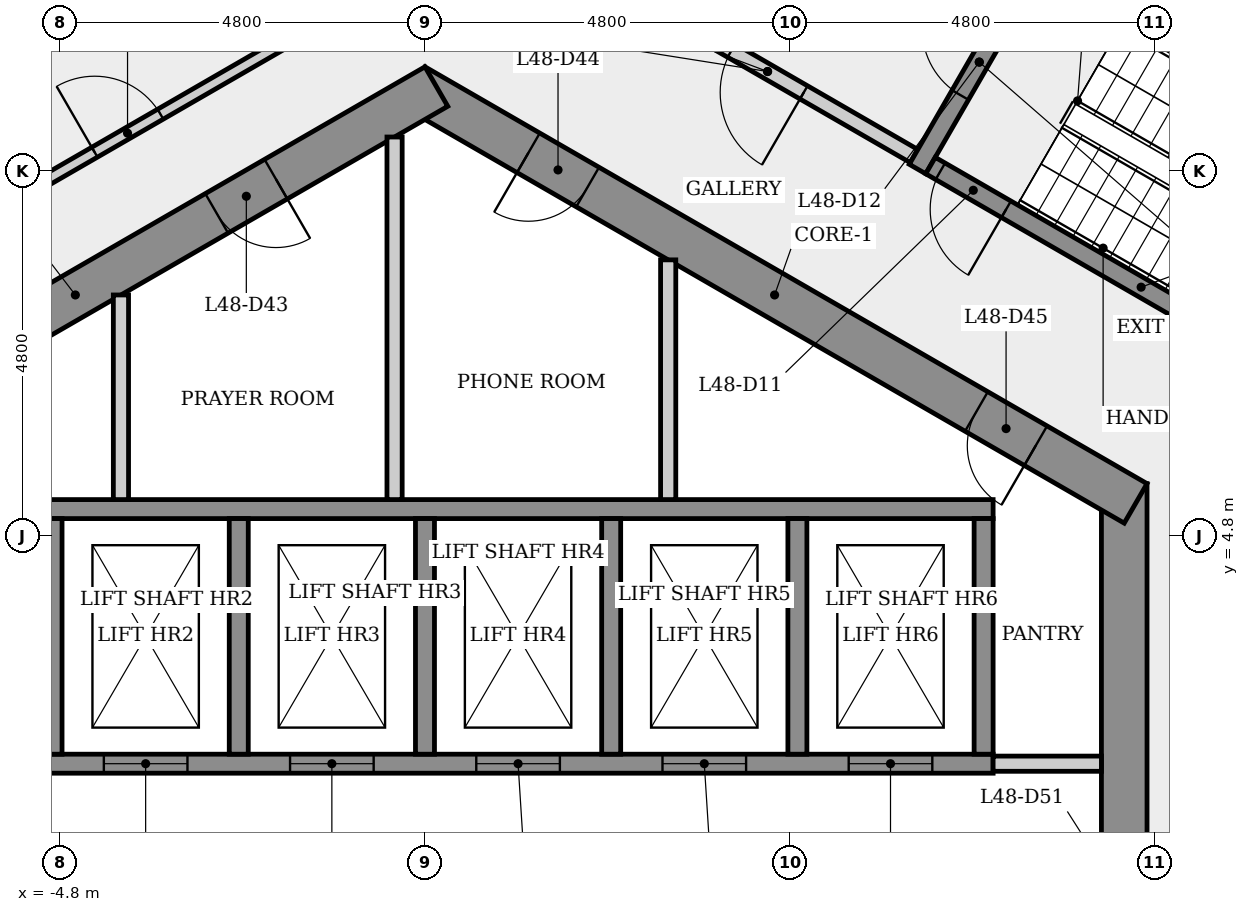
"""IFC4 building model, lengths in metres.
Left out: names, types, materials, properties, quantities, classifications, styles, units other than length and angle.
Written with IfcOpenShell. Run it as: python <this file> out.ifc"""

import sys

from ifc_helpers import new_model, si_unit, direction, frame, frame_2d, origin, place, context, subcontext, project, spatial, rectangle, extrude, element, fill, save


model = new_model("IFC4")
c1 = context("Model", 3, precision=1e-05, world=origin(), true_north=direction((0.0, 1.0)))
c2 = subcontext(c1, "Body", "Model", "MODEL_VIEW")
j1 = project(units=[si_unit("LENGTHUNIT", "METRE"), si_unit("PLANEANGLEUNIT", "RADIAN")], contexts=[c1])
p1 = place(None, origin())
s1 = spatial("IfcSite", under=j1, at=p1, CompositionType="ELEMENT")
p2 = place(p1, origin())
s2 = spatial("IfcBuilding", under=s1, at=p2, CompositionType="ELEMENT")
p3 = place(p2, frame((0.0, 0.0, 179.9)))
s3 = spatial("IfcBuildingStorey", under=s2, at=p3, CompositionType="ELEMENT", Elevation=179.9)
p4 = place(p3, frame((9.2, -5.485, 0.0), z_axis=(0.0, 0.0, 1.0), x_axis=(0.0, 1.0, 0.0)))
e1 = element("IfcWall", 1, at=p4, inside=s3, PredefinedType="SHEAR", context=c2, shape_type="SweptSolid", body=[
    extrude(rectangle(XDim=10.97, YDim=0.6, at=frame_2d((5.485, 0.0))), origin(), (0.0, 0.0, 1.0), 3.4),
])
p5 = place(p4, frame((4.685, 0.0, 0.0)))
e2 = element("IfcOpeningElement", 2, at=p5, cuts=e1, PredefinedType="OPENING", context=c2, shape_type="SweptSolid", body=[
    extrude(rectangle(XDim=1.6, YDim=2.1, at=frame_2d((0.8, 1.05))), frame((0.0, 0.31, 0.0), z_axis=(0.0, -1.0, 0.0), x_axis=(1.0, 0.0, 0.0)), (0.0, 0.0, 1.0), 0.62),
])
p6 = place(p3, frame((9.35, 5.225, 0.0), z_axis=(0.0, 0.0, 1.0), x_axis=(-0.866023993627, 0.500002442456, 0.0)))
e3 = element("IfcWall", 3, at=p6, inside=s3, PredefinedType="SHEAR", context=c2, shape_type="SweptSolid", body=[
    extrude(rectangle(XDim=10.97, YDim=0.6, at=frame_2d((5.485, 0.0))), origin(), (0.0, 0.0, 1.0), 3.4),
])
p7 = place(p6, frame((8.325, 0.0, 0.0)))
e4 = element("IfcOpeningElement", 4, at=p7, cuts=e3, PredefinedType="OPENING", context=c2, shape_type="SweptSolid", body=[
    extrude(rectangle(XDim=0.9, YDim=2.1, at=frame_2d((0.45, 1.05))), frame((0.0, 0.31, 0.0), z_axis=(0.0, -1.0, 0.0), x_axis=(1.0, 0.0, 0.0)), (0.0, 0.0, 1.0), 0.62),
])
p8 = place(p6, frame((1.518, 0.0, 0.0)))
e5 = element("IfcOpeningElement", 5, at=p8, cuts=e3, PredefinedType="OPENING", context=c2, shape_type="SweptSolid", body=[
    extrude(rectangle(XDim=0.9, YDim=2.1, at=frame_2d((0.45, 1.05))), frame((0.0, 0.31, 0.0), z_axis=(0.0, -1.0, 0.0), x_axis=(1.0, 0.0, 0.0)), (0.0, 0.0, 1.0), 0.62),
])
p9 = place(p3, frame((0.15, 10.71, 0.0), z_axis=(0.0, 0.0, 1.0), x_axis=(-0.866023993627, -0.500002442456, 0.0)))
e6 = element("IfcWall", 6, at=p9, inside=s3, PredefinedType="SHEAR", context=c2, shape_type="SweptSolid", body=[
    extrude(rectangle(XDim=10.97, YDim=0.6, at=frame_2d((5.485, 0.0))), origin(), (0.0, 0.0, 1.0), 3.4),
])
p10 = place(p9, frame((9.013, 0.0, 0.0)))
e7 = element("IfcOpeningElement", 7, at=p10, cuts=e6, PredefinedType="OPENING", context=c2, shape_type="SweptSolid", body=[
    extrude(rectangle(XDim=0.9, YDim=2.1, at=frame_2d((0.45, 1.05))), frame((0.0, 0.31, 0.0), z_axis=(0.0, -1.0, 0.0), x_axis=(1.0, 0.0, 0.0)), (0.0, 0.0, 1.0), 0.62),
])
p11 = place(p9, frame((2.437, 0.0, 0.0)))
e8 = element("IfcOpeningElement", 8, at=p11, cuts=e6, PredefinedType="OPENING", context=c2, shape_type="SweptSolid", body=[
    extrude(rectangle(XDim=0.9, YDim=2.1, at=frame_2d((0.45, 1.05))), frame((0.0, 0.31, 0.0), z_axis=(0.0, -1.0, 0.0), x_axis=(1.0, 0.0, 0.0)), (0.0, 0.0, 1.0), 0.62),
])
p12 = place(p3, frame((-9.556, 6.838, 0.0), z_axis=(0.0, 0.0, 1.0), x_axis=(0.866029004385, 0.499993763526, 0.0)))
e9 = element("IfcWall", 9, at=p12, inside=s3, PredefinedType="PARTITIONING", context=c2, shape_type="SweptSolid", body=[
    extrude(rectangle(XDim=9.789, YDim=0.15, at=frame_2d((4.895, 0.0))), origin(), (0.0, 0.0, 1.0), 3.05),
])
p13 = place(p12, frame((6.016, 0.0, 0.0)))
e10 = element("IfcOpeningElement", 10, at=p13, cuts=e9, PredefinedType="OPENING", context=c2, shape_type="SweptSolid", body=[
    extrude(rectangle(XDim=1.0, YDim=2.1, at=frame_2d((0.5, 1.05))), frame((0.0, 0.085, 0.0), z_axis=(0.0, -1.0, 0.0), x_axis=(1.0, 0.0, 0.0)), (0.0, 0.0, 1.0), 0.17),
])
p14 = place(p3, frame((-7.475, 1.8, 0.0), z_axis=(0.0, 0.0, 1.0), x_axis=(1.0, 0.0, 0.0)))
e11 = element("IfcWall", 11, at=p14, inside=s3, PredefinedType="SHEAR", context=c2, shape_type="SweptSolid", body=[
    extrude(rectangle(XDim=14.95, YDim=0.25, at=frame_2d((7.475, 0.0))), origin(), (0.0, 0.0, 1.0), 3.05),
])
p15 = place(p14, frame((0.8, 0.0, 0.0)))
e12 = element("IfcOpeningElement", 12, at=p15, cuts=e11, PredefinedType="OPENING", context=c2, shape_type="SweptSolid", body=[
    extrude(rectangle(XDim=1.1, YDim=2.1, at=frame_2d((0.55, 1.05))), frame((0.0, 0.135, 0.0), z_axis=(0.0, -1.0, 0.0), x_axis=(1.0, 0.0, 0.0)), (0.0, 0.0, 1.0), 0.27),
])
p16 = place(p14, frame((3.25, 0.0, 0.0)))
e13 = element("IfcOpeningElement", 13, at=p16, cuts=e11, PredefinedType="OPENING", context=c2, shape_type="SweptSolid", body=[
    extrude(rectangle(XDim=1.1, YDim=2.1, at=frame_2d((0.55, 1.05))), frame((0.0, 0.135, 0.0), z_axis=(0.0, -1.0, 0.0), x_axis=(1.0, 0.0, 0.0)), (0.0, 0.0, 1.0), 0.27),
])
p17 = place(p14, frame((5.7, 0.0, 0.0)))
e14 = element("IfcOpeningElement", 14, at=p17, cuts=e11, PredefinedType="OPENING", context=c2, shape_type="SweptSolid", body=[
    extrude(rectangle(XDim=1.1, YDim=2.1, at=frame_2d((0.55, 1.05))), frame((0.0, 0.135, 0.0), z_axis=(0.0, -1.0, 0.0), x_axis=(1.0, 0.0, 0.0)), (0.0, 0.0, 1.0), 0.27),
])
p18 = place(p14, frame((8.15, 0.0, 0.0)))
e15 = element("IfcOpeningElement", 15, at=p18, cuts=e11, PredefinedType="OPENING", context=c2, shape_type="SweptSolid", body=[
    extrude(rectangle(XDim=1.1, YDim=2.1, at=frame_2d((0.55, 1.05))), frame((0.0, 0.135, 0.0), z_axis=(0.0, -1.0, 0.0), x_axis=(1.0, 0.0, 0.0)), (0.0, 0.0, 1.0), 0.27),
])
p19 = place(p14, frame((10.6, 0.0, 0.0)))
e16 = element("IfcOpeningElement", 16, at=p19, cuts=e11, PredefinedType="OPENING", context=c2, shape_type="SweptSolid", body=[
    extrude(rectangle(XDim=1.1, YDim=2.1, at=frame_2d((0.55, 1.05))), frame((0.0, 0.135, 0.0), z_axis=(0.0, -1.0, 0.0), x_axis=(1.0, 0.0, 0.0)), (0.0, 0.0, 1.0), 0.27),
])
p20 = place(p14, frame((13.05, 0.0, 0.0)))
e17 = element("IfcOpeningElement", 17, at=p20, cuts=e11, PredefinedType="OPENING", context=c2, shape_type="SweptSolid", body=[
    extrude(rectangle(XDim=1.1, YDim=2.1, at=frame_2d((0.55, 1.05))), frame((0.0, 0.135, 0.0), z_axis=(0.0, -1.0, 0.0), x_axis=(1.0, 0.0, 0.0)), (0.0, 0.0, 1.0), 0.27),
])
p21 = place(p3, frame((-7.225, 5.15, 0.0), z_axis=(0.0, 0.0, 1.0), x_axis=(1.0, 0.0, 0.0)))
e18 = element("IfcWall", 18, at=p21, inside=s3, PredefinedType="SHEAR", context=c2, shape_type="SweptSolid", body=[
    extrude(rectangle(XDim=14.7, YDim=0.25, at=frame_2d((7.35, 0.0))), origin(), (0.0, 0.0, 1.0), 3.05),
])
p22 = place(p3, frame((-4.9, 5.025, 0.0), z_axis=(0.0, 0.0, 1.0), x_axis=(0.0, -1.0, 0.0)))
e19 = element("IfcWall", 19, at=p22, inside=s3, PredefinedType="SHEAR", context=c2, shape_type="SweptSolid", body=[
    extrude(rectangle(XDim=3.1, YDim=0.25, at=frame_2d((1.55, 0.0))), origin(), (0.0, 0.0, 1.0), 3.4),
])
p23 = place(p3, frame((-4.0, 7.967, 0.0), z_axis=(0.0, 0.0, 1.0), x_axis=(0.0, -1.0, 0.0)))
e20 = element("IfcWall", 20, at=p23, inside=s3, PredefinedType="PARTITIONING", context=c2, shape_type="SweptSolid", body=[
    extrude(rectangle(XDim=2.692, YDim=0.2, at=frame_2d((1.346, 0.0))), origin(), (0.0, 0.0, 1.0), 3.05),
])
p24 = place(p3, frame((-2.45, 5.025, 0.0), z_axis=(0.0, 0.0, 1.0), x_axis=(0.0, -1.0, 0.0)))
e21 = element("IfcWall", 21, at=p24, inside=s3, PredefinedType="SHEAR", context=c2, shape_type="SweptSolid", body=[
    extrude(rectangle(XDim=3.1, YDim=0.25, at=frame_2d((1.55, 0.0))), origin(), (0.0, 0.0, 1.0), 3.4),
])
p25 = place(p3, frame((-0.4, 10.046, 0.0), z_axis=(0.0, 0.0, 1.0), x_axis=(0.0, -1.0, 0.0)))
e22 = element("IfcWall", 22, at=p25, inside=s3, PredefinedType="PARTITIONING", context=c2, shape_type="SweptSolid", body=[
    extrude(rectangle(XDim=4.771, YDim=0.2, at=frame_2d((2.385, 0.0))), origin(), (0.0, 0.0, 1.0), 3.05),
])
for number, where, z_axis, x_axis in (
    (23, (0.0, 5.025, 0.0), (0.0, 0.0, 1.0), (0.0, -1.0, 0.0)),
    (24, (2.45, 5.025, 0.0), (0.0, 0.0, 1.0), (0.0, -1.0, 0.0)),
):
    element("IfcWall", number, at=place(p3, frame(where, z_axis=z_axis, x_axis=x_axis)), inside=s3, PredefinedType="SHEAR", context=c2, shape_type="SweptSolid", body=[
        extrude(rectangle(XDim=3.1, YDim=0.25, at=frame_2d((1.55, 0.0))), origin(), (0.0, 0.0, 1.0), 3.4),
    ])
p26 = place(p3, frame((3.2, 8.429, 0.0), z_axis=(0.0, 0.0, 1.0), x_axis=(0.0, -1.0, 0.0)))
e25 = element("IfcWall", 25, at=p26, inside=s3, PredefinedType="PARTITIONING", context=c2, shape_type="SweptSolid", body=[
    extrude(rectangle(XDim=3.154, YDim=0.2, at=frame_2d((1.577, 0.0))), origin(), (0.0, 0.0, 1.0), 3.05),
])
p27 = place(p3, frame((4.9, 5.025, 0.0), z_axis=(0.0, 0.0, 1.0), x_axis=(0.0, -1.0, 0.0)))
e26 = element("IfcWall", 26, at=p27, inside=s3, PredefinedType="SHEAR", context=c2, shape_type="SweptSolid", body=[
    extrude(rectangle(XDim=3.1, YDim=0.25, at=frame_2d((1.55, 0.0))), origin(), (0.0, 0.0, 1.0), 3.4),
])
p28 = place(p3, frame((6.435, 9.795, 0.0), z_axis=(0.0, 0.0, 1.0), x_axis=(-0.866012907634, 0.500021643343, 0.0)))
e27 = element("IfcWall", 27, at=p28, inside=s3, PredefinedType="PARTITIONING", context=c2, shape_type="SweptSolid", body=[
    extrude(rectangle(XDim=4.45, YDim=0.2, at=frame_2d((2.225, 0.0))), origin(), (0.0, 0.0, 1.0), 3.05),
])
p29 = place(p28, frame((1.675, 0.0, 0.0)))
e28 = element("IfcOpeningElement", 28, at=p29, cuts=e27, PredefinedType="OPENING", context=c2, shape_type="SweptSolid", body=[
    extrude(rectangle(XDim=1.1, YDim=2.1, at=frame_2d((0.55, 1.05))), frame((0.0, 0.11, 0.0), z_axis=(0.0, -1.0, 0.0), x_axis=(1.0, 0.0, 0.0)), (0.0, 0.0, 1.0), 0.22),
])
p30 = place(p3, frame((6.48, 9.624, 0.0), z_axis=(0.0, 0.0, 1.0), x_axis=(0.500017246033, 0.866015446554, 0.0)))
e29 = element("IfcWall", 29, at=p30, inside=s3, PredefinedType="SHEAR", context=c2, shape_type="SweptSolid", body=[
    extrude(rectangle(XDim=3.25, YDim=0.25, at=frame_2d((1.625, 0.0))), origin(), (0.0, 0.0, 1.0), 3.05),
])
p31 = place(p30, frame((1.125, 0.0, 0.0)))
e30 = element("IfcOpeningElement", 30, at=p31, cuts=e29, PredefinedType="OPENING", context=c2, shape_type="SweptSolid", body=[
    extrude(rectangle(XDim=1.0, YDim=2.1, at=frame_2d((0.5, 1.05))), frame((0.0, 0.135, 0.0), z_axis=(0.0, -1.0, 0.0), x_axis=(1.0, 0.0, 0.0)), (0.0, 0.0, 1.0), 0.27),
])
p32 = place(p3, frame((7.475, 1.8, 0.0), z_axis=(0.0, 0.0, 1.0), x_axis=(1.0, 0.0, 0.0)))
e31 = element("IfcWall", 31, at=p32, inside=s3, PredefinedType="PARTITIONING", context=c2, shape_type="SweptSolid", body=[
    extrude(rectangle(XDim=1.425, YDim=0.2, at=frame_2d((0.712, 0.0))), origin(), (0.0, 0.0, 1.0), 3.05),
])
p33 = place(p3, frame((7.35, 5.025, 0.0), z_axis=(0.0, 0.0, 1.0), x_axis=(0.0, -1.0, 0.0)))
e32 = element("IfcWall", 32, at=p33, inside=s3, PredefinedType="SHEAR", context=c2, shape_type="SweptSolid", body=[
    extrude(rectangle(XDim=3.1, YDim=0.25, at=frame_2d((1.55, 0.0))), origin(), (0.0, 0.0, 1.0), 3.4),
])
p34 = place(p3, frame((8.151, 12.268, 0.0), z_axis=(0.0, 0.0, 1.0), x_axis=(0.866025499775, -0.499999833739, 0.0)))
e33 = element("IfcWall", 33, at=p34, inside=s3, PredefinedType="SHEAR", context=c2, shape_type="SweptSolid", body=[
    extrude(rectangle(XDim=6.4, YDim=0.25, at=frame_2d((3.2, 0.0))), origin(), (0.0, 0.0, 1.0), 3.05),
])
p35 = place(p3, frame((12.194, 6.47, 0.0), z_axis=(0.0, 0.0, 1.0), x_axis=(-0.866025499775, 0.499999833739, 0.0)))
e34 = element("IfcWall", 34, at=p35, inside=s3, PredefinedType="SHEAR", context=c2, shape_type="SweptSolid", body=[
    extrude(rectangle(XDim=6.4, YDim=0.25, at=frame_2d((3.2, 0.0))), origin(), (0.0, 0.0, 1.0), 3.05),
])
p36 = place(p35, frame((5.25, 0.0, 0.0)))
e35 = element("IfcOpeningElement", 35, at=p36, cuts=e34, PredefinedType="OPENING", context=c2, shape_type="SweptSolid", body=[
    extrude(rectangle(XDim=1.0, YDim=2.1, at=frame_2d((0.5, 1.05))), frame((0.0, 0.135, 0.0), z_axis=(0.0, -1.0, 0.0), x_axis=(1.0, 0.0, 0.0)), (0.0, 0.0, 1.0), 0.27),
])
p37 = place(p16, origin())
e36 = element("IfcDoor", 36, at=p37, inside=s3, OperationType="SLIDING_TO_LEFT", PredefinedType="DOOR", context=c2, shape_type="SweptSolid", body=[
    extrude(rectangle(XDim=1.1, YDim=2.1, at=frame_2d((0.55, 1.05))), frame((0.0, 0.025, 0.0), z_axis=(0.0, -1.0, 0.0), x_axis=(1.0, 0.0, 0.0)), (0.0, 0.0, 1.0), 0.05),
])
fill(e13, e36)
p38 = place(p17, origin())
e37 = element("IfcDoor", 37, at=p38, inside=s3, OperationType="SLIDING_TO_LEFT", PredefinedType="DOOR", context=c2, shape_type="SweptSolid", body=[
    extrude(rectangle(XDim=1.1, YDim=2.1, at=frame_2d((0.55, 1.05))), frame((0.0, 0.025, 0.0), z_axis=(0.0, -1.0, 0.0), x_axis=(1.0, 0.0, 0.0)), (0.0, 0.0, 1.0), 0.05),
])
fill(e14, e37)
p39 = place(p18, origin())
e38 = element("IfcDoor", 38, at=p39, inside=s3, OperationType="SLIDING_TO_LEFT", PredefinedType="DOOR", context=c2, shape_type="SweptSolid", body=[
    extrude(rectangle(XDim=1.1, YDim=2.1, at=frame_2d((0.55, 1.05))), frame((0.0, 0.025, 0.0), z_axis=(0.0, -1.0, 0.0), x_axis=(1.0, 0.0, 0.0)), (0.0, 0.0, 1.0), 0.05),
])
fill(e15, e38)
p40 = place(p19, origin())
e39 = element("IfcDoor", 39, at=p40, inside=s3, OperationType="SLIDING_TO_LEFT", PredefinedType="DOOR", context=c2, shape_type="SweptSolid", body=[
    extrude(rectangle(XDim=1.1, YDim=2.1, at=frame_2d((0.55, 1.05))), frame((0.0, 0.025, 0.0), z_axis=(0.0, -1.0, 0.0), x_axis=(1.0, 0.0, 0.0)), (0.0, 0.0, 1.0), 0.05),
])
fill(e16, e39)
p41 = place(p20, origin())
e40 = element("IfcDoor", 40, at=p41, inside=s3, OperationType="SLIDING_TO_LEFT", PredefinedType="DOOR", context=c2, shape_type="SweptSolid", body=[
    extrude(rectangle(XDim=1.1, YDim=2.1, at=frame_2d((0.55, 1.05))), frame((0.0, 0.025, 0.0), z_axis=(0.0, -1.0, 0.0), x_axis=(1.0, 0.0, 0.0)), (0.0, 0.0, 1.0), 0.05),
])
fill(e17, e40)
p42 = place(p36, origin())
e41 = element("IfcDoor", 41, at=p42, inside=s3, OperationType="SINGLE_SWING_LEFT", PredefinedType="DOOR", context=c2, shape_type="SweptSolid", body=[
    extrude(rectangle(XDim=1.0, YDim=2.1, at=frame_2d((0.5, 1.05))), frame((0.0, 0.025, 0.0), z_axis=(0.0, -1.0, 0.0), x_axis=(1.0, 0.0, 0.0)), (0.0, 0.0, 1.0), 0.05),
])
fill(e35, e41)
p43 = place(p31, origin())
e42 = element("IfcDoor", 42, at=p43, inside=s3, OperationType="SINGLE_SWING_RIGHT", PredefinedType="DOOR", context=c2, shape_type="SweptSolid", body=[
    extrude(rectangle(XDim=1.0, YDim=2.1, at=frame_2d((0.5, 1.05))), frame((0.0, 0.025, 0.0), z_axis=(0.0, -1.0, 0.0), x_axis=(1.0, 0.0, 0.0)), (0.0, 0.0, 1.0), 0.05),
])
fill(e30, e42)
p44 = place(p29, origin())
e43 = element("IfcDoor", 43, at=p44, inside=s3, OperationType="SINGLE_SWING_LEFT", PredefinedType="DOOR", context=c2, shape_type="SweptSolid", body=[
    extrude(rectangle(XDim=1.1, YDim=2.1, at=frame_2d((0.55, 1.05))), frame((0.0, 0.025, 0.0), z_axis=(0.0, -1.0, 0.0), x_axis=(1.0, 0.0, 0.0)), (0.0, 0.0, 1.0), 0.05),
])
fill(e28, e43)
p45 = place(p13, origin())
e44 = element("IfcDoor", 44, at=p45, inside=s3, OperationType="SINGLE_SWING_LEFT", PredefinedType="DOOR", context=c2, shape_type="SweptSolid", body=[
    extrude(rectangle(XDim=1.0, YDim=2.1, at=frame_2d((0.5, 1.05))), frame((0.0, 0.025, 0.0), z_axis=(0.0, -1.0, 0.0), x_axis=(1.0, 0.0, 0.0)), (0.0, 0.0, 1.0), 0.05),
])
fill(e10, e44)
p46 = place(p11, origin())
e45 = element("IfcDoor", 45, at=p46, inside=s3, OperationType="SINGLE_SWING_LEFT", PredefinedType="DOOR", context=c2, shape_type="SweptSolid", body=[
    extrude(rectangle(XDim=0.9, YDim=2.1, at=frame_2d((0.45, 1.05))), frame((0.0, 0.025, 0.0), z_axis=(0.0, -1.0, 0.0), x_axis=(1.0, 0.0, 0.0)), (0.0, 0.0, 1.0), 0.05),
])
fill(e8, e45)
p47 = place(p7, origin())
e46 = element("IfcDoor", 46, at=p47, inside=s3, OperationType="SINGLE_SWING_RIGHT", PredefinedType="DOOR", context=c2, shape_type="SweptSolid", body=[
    extrude(rectangle(XDim=0.9, YDim=2.1, at=frame_2d((0.45, 1.05))), frame((0.0, 0.025, 0.0), z_axis=(0.0, -1.0, 0.0), x_axis=(1.0, 0.0, 0.0)), (0.0, 0.0, 1.0), 0.05),
])
fill(e4, e46)
p48 = place(p8, origin())
e47 = element("IfcDoor", 47, at=p48, inside=s3, OperationType="SINGLE_SWING_LEFT", PredefinedType="DOOR", context=c2, shape_type="SweptSolid", body=[
    extrude(rectangle(XDim=0.9, YDim=2.1, at=frame_2d((0.45, 1.05))), frame((0.0, 0.025, 0.0), z_axis=(0.0, -1.0, 0.0), x_axis=(1.0, 0.0, 0.0)), (0.0, 0.0, 1.0), 0.05),
])
fill(e5, e47)
save(model, sys.argv[1])
